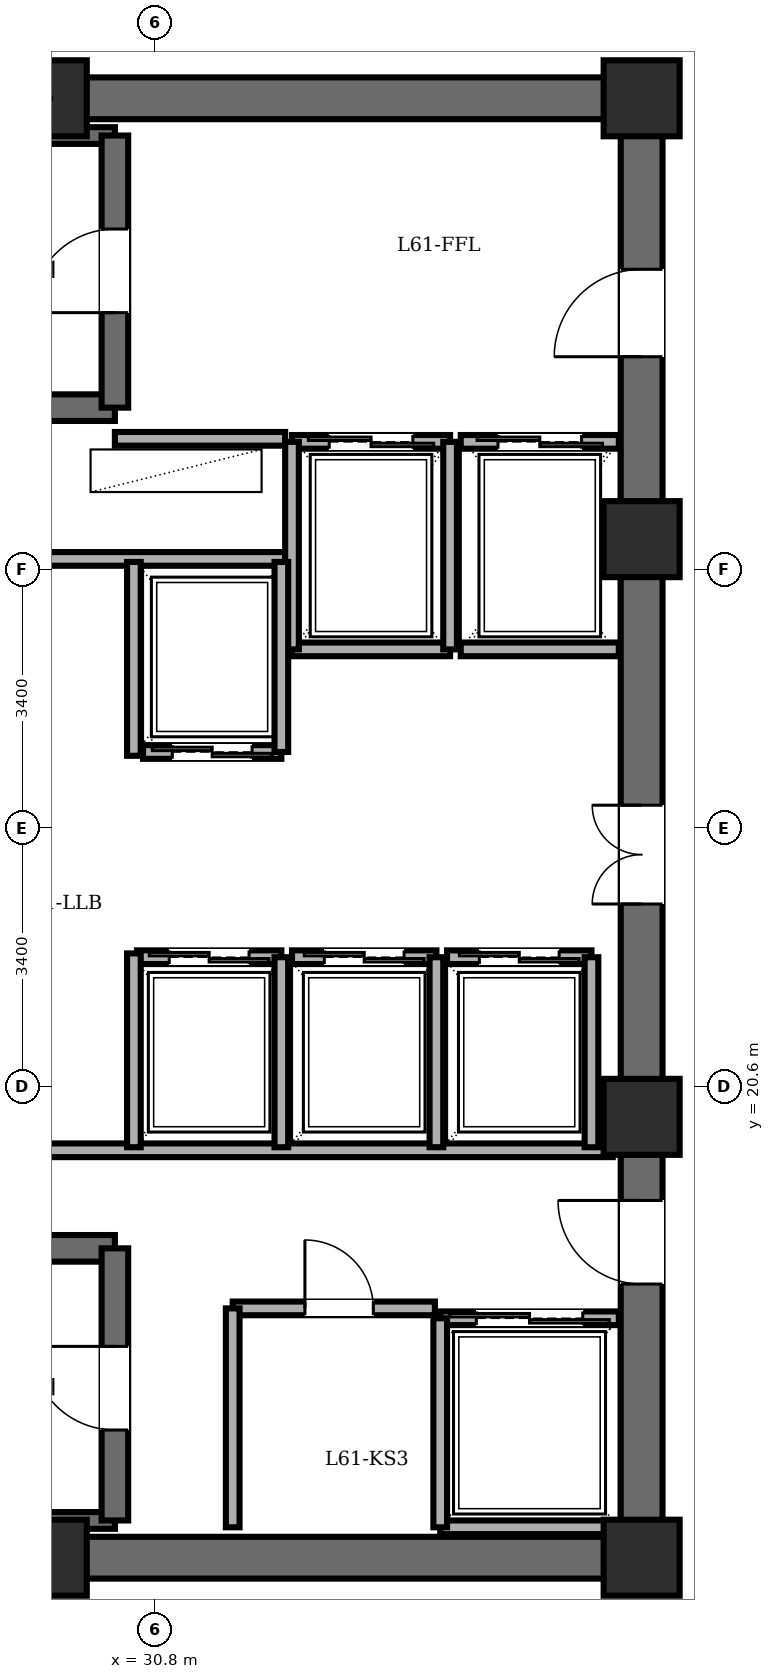
"""IFC4 building model, lengths in metres.
Left out: names, types, materials, properties, quantities, classifications, styles, units other than length and angle.
Written with IfcOpenShell. Run it as: python <this file> out.ifc"""

import sys

from ifc_helpers import new_model, si_unit, direction, frame, frame_2d, origin, origin_2d, place, context, subcontext, project, spatial, rectangle, extrude, element, fill, save


model = new_model("IFC4")
c1 = context("Model", 3, precision=1e-05, world=origin(), true_north=direction((0.0, 1.0)))
c2 = subcontext(c1, "Body", "Model", "MODEL_VIEW")
j1 = project(units=[si_unit("LENGTHUNIT", "METRE"), si_unit("PLANEANGLEUNIT", "RADIAN")], contexts=[c1])
p1 = place(None, origin())
s1 = spatial("IfcSite", under=j1, at=p1, CompositionType="ELEMENT")
p2 = place(p1, origin())
s2 = spatial("IfcBuilding", under=s1, at=p2, CompositionType="ELEMENT")
p3 = place(p2, frame((0.0, 0.0, 233.7)))
s3 = spatial("IfcBuildingStorey", under=s2, at=p3, CompositionType="ELEMENT", Elevation=233.7)
for number, where, z_axis, x_axis in (
    (1, (29.4, 14.4, 0.0), (0.0, 0.0, 1.0), (1.0, 0.0, 0.0)),
    (2, (37.2, 14.4, 0.0), (0.0, 0.0, 1.0), (1.0, 0.0, 0.0)),
    (3, (37.2, 20.2, 0.0), (0.0, 0.0, 1.0), (1.0, 0.0, 0.0)),
    (4, (37.2, 27.8, 0.0), (0.0, 0.0, 1.0), (1.0, 0.0, 0.0)),
    (5, (37.2, 33.6, 0.0), (0.0, 0.0, 1.0), (1.0, 0.0, 0.0)),
    (6, (29.4, 33.6, 0.0), (0.0, 0.0, 1.0), (1.0, 0.0, 0.0)),
):
    element("IfcColumn", number, at=place(p3, frame(where, z_axis=z_axis, x_axis=x_axis)), inside=s3, PredefinedType="COLUMN", context=c2, shape_type="SweptSolid", body=[
        extrude(rectangle(XDim=1.0, YDim=1.0, at=origin_2d()), origin(), (0.0, 0.0, 1.0), 3.6),
    ])
for number, where, z_axis, x_axis in (
    (7, (21.6, 33.6, 0.0), (0.0, 0.0, 1.0), (1.0, 0.0, 0.0)),
    (8, (37.2, 14.4, 0.0), (0.0, 0.0, 1.0), (-1.0, 0.0, 0.0)),
):
    element("IfcWall", number, at=place(p3, frame(where, z_axis=z_axis, x_axis=x_axis)), inside=s3, PredefinedType="SHEAR", context=c2, shape_type="SweptSolid", body=[
        extrude(rectangle(XDim=15.6, YDim=0.55, at=frame_2d((7.8, 0.0))), origin(), (0.0, 0.0, 1.0), 3.4),
    ])
p4 = place(p3, frame((37.2, 14.4, 0.0), z_axis=(0.0, 0.0, 1.0), x_axis=(0.0, 1.0, 0.0)))
e9 = element("IfcWall", 9, at=p4, inside=s3, PredefinedType="SHEAR", context=c2, shape_type="SweptSolid", body=[
    extrude(rectangle(XDim=19.2, YDim=0.55, at=frame_2d((9.6, 0.0))), origin(), (0.0, 0.0, 1.0), 3.4),
])
p5 = place(p4, frame((15.8, 0.0, 0.0)))
e10 = element("IfcOpeningElement", 10, at=p5, cuts=e9, PredefinedType="OPENING", context=c2, shape_type="SweptSolid", body=[
    extrude(rectangle(XDim=1.15, YDim=2.15, at=frame_2d((0.575, 1.075))), frame((0.0, 0.285, 0.0), z_axis=(0.0, -1.0, 0.0), x_axis=(1.0, 0.0, 0.0)), (0.0, 0.0, 1.0), 0.57),
])
p6 = place(p4, frame((3.6, 0.0, 0.0)))
e11 = element("IfcOpeningElement", 11, at=p6, cuts=e9, PredefinedType="OPENING", context=c2, shape_type="SweptSolid", body=[
    extrude(rectangle(XDim=1.1, YDim=2.15, at=frame_2d((0.55, 1.075))), frame((0.0, 0.285, 0.0), z_axis=(0.0, -1.0, 0.0), x_axis=(1.0, 0.0, 0.0)), (0.0, 0.0, 1.0), 0.57),
])
p7 = place(p4, frame((8.6, 0.0, 0.0)))
e12 = element("IfcOpeningElement", 12, at=p7, cuts=e9, PredefinedType="OPENING", context=c2, shape_type="SweptSolid", body=[
    extrude(rectangle(XDim=1.3, YDim=2.2, at=frame_2d((0.65, 1.1))), frame((0.0, 0.285, 0.0), z_axis=(0.0, -1.0, 0.0), x_axis=(1.0, 0.0, 0.0)), (0.0, 0.0, 1.0), 0.57),
])
p8 = place(p3, frame((22.48, 29.53, 0.0), z_axis=(0.0, 0.0, 1.0), x_axis=(1.0, 0.0, 0.0)))
e13 = element("IfcWall", 13, at=p8, inside=s3, PredefinedType="SOLIDWALL", context=c2, shape_type="SweptSolid", body=[
    extrude(rectangle(XDim=7.79, YDim=0.35, at=frame_2d((3.895, 0.0))), origin(), (0.0, 0.0, 1.0), 3.4),
])
p9 = place(p3, frame((22.48, 33.11, 0.0), z_axis=(0.0, 0.0, 1.0), x_axis=(1.0, 0.0, 0.0)))
e14 = element("IfcWall", 14, at=p9, inside=s3, PredefinedType="PARTITIONING", context=c2, shape_type="SweptSolid", body=[
    extrude(rectangle(XDim=7.79, YDim=0.22, at=frame_2d((3.895, 0.0))), origin(), (0.0, 0.0, 1.0), 3.4),
])
p10 = place(p3, frame((30.27, 29.53, 0.0), z_axis=(0.0, 0.0, 1.0), x_axis=(0.0, 1.0, 0.0)))
e15 = element("IfcWall", 15, at=p10, inside=s3, PredefinedType="SOLIDWALL", context=c2, shape_type="SweptSolid", body=[
    extrude(rectangle(XDim=3.58, YDim=0.35, at=frame_2d((1.79, 0.0))), origin(), (0.0, 0.0, 1.0), 3.4),
])
p11 = place(p10, frame((1.25, 0.0, 0.0)))
e16 = element("IfcOpeningElement", 16, at=p11, cuts=e15, PredefinedType="OPENING", context=c2, shape_type="SweptSolid", body=[
    extrude(rectangle(XDim=1.1, YDim=2.15, at=frame_2d((0.55, 1.075))), frame((0.0, 0.185, 0.0), z_axis=(0.0, -1.0, 0.0), x_axis=(1.0, 0.0, 0.0)), (0.0, 0.0, 1.0), 0.37),
])
p12 = place(p3, frame((22.48, 18.47, 0.0), z_axis=(0.0, 0.0, 1.0), x_axis=(1.0, 0.0, 0.0)))
e17 = element("IfcWall", 17, at=p12, inside=s3, PredefinedType="SOLIDWALL", context=c2, shape_type="SweptSolid", body=[
    extrude(rectangle(XDim=7.79, YDim=0.35, at=frame_2d((3.895, 0.0))), origin(), (0.0, 0.0, 1.0), 3.4),
])
p13 = place(p3, frame((22.48, 14.89, 0.0), z_axis=(0.0, 0.0, 1.0), x_axis=(1.0, 0.0, 0.0)))
e18 = element("IfcWall", 18, at=p13, inside=s3, PredefinedType="PARTITIONING", context=c2, shape_type="SweptSolid", body=[
    extrude(rectangle(XDim=7.79, YDim=0.22, at=frame_2d((3.895, 0.0))), origin(), (0.0, 0.0, 1.0), 3.4),
])
p14 = place(p3, frame((30.27, 14.89, 0.0), z_axis=(0.0, 0.0, 1.0), x_axis=(0.0, 1.0, 0.0)))
e19 = element("IfcWall", 19, at=p14, inside=s3, PredefinedType="SOLIDWALL", context=c2, shape_type="SweptSolid", body=[
    extrude(rectangle(XDim=3.58, YDim=0.35, at=frame_2d((1.79, 0.0))), origin(), (0.0, 0.0, 1.0), 3.4),
])
p15 = place(p14, frame((1.19, 0.0, 0.0)))
e20 = element("IfcOpeningElement", 20, at=p15, cuts=e19, PredefinedType="OPENING", context=c2, shape_type="SweptSolid", body=[
    extrude(rectangle(XDim=1.1, YDim=2.15, at=frame_2d((0.55, 1.075))), frame((0.0, 0.185, 0.0), z_axis=(0.0, -1.0, 0.0), x_axis=(1.0, 0.0, 0.0)), (0.0, 0.0, 1.0), 0.37),
])
p16 = place(p3, frame((30.27, 29.12, 0.0), z_axis=(0.0, 0.0, 1.0), x_axis=(1.0, 0.0, 0.0)))
e21 = element("IfcWall", 21, at=p16, inside=s3, PredefinedType="PARTITIONING", context=c2, shape_type="SweptSolid", body=[
    extrude(rectangle(XDim=2.24, YDim=0.18, at=frame_2d((1.12, 0.0))), origin(), (0.0, 0.0, 1.0), 3.4),
])
p17 = place(p3, frame((21.95, 27.54, 0.0), z_axis=(0.0, 0.0, 1.0), x_axis=(1.0, 0.0, 0.0)))
e22 = element("IfcWall", 22, at=p17, inside=s3, PredefinedType="PARTITIONING", context=c2, shape_type="SweptSolid", body=[
    extrude(rectangle(XDim=10.56, YDim=0.18, at=frame_2d((5.28, 0.0))), origin(), (0.0, 0.0, 1.0), 3.4),
])
p18 = place(p3, frame((21.95, 19.76, 0.0), z_axis=(0.0, 0.0, 1.0), x_axis=(1.0, 0.0, 0.0)))
e23 = element("IfcWall", 23, at=p18, inside=s3, PredefinedType="PARTITIONING", context=c2, shape_type="SweptSolid", body=[
    extrude(rectangle(XDim=14.87, YDim=0.18, at=frame_2d((7.435, 0.0))), origin(), (0.0, 0.0, 1.0), 3.4),
])
p19 = place(p3, frame((31.82, 17.68, 0.0), z_axis=(0.0, 0.0, 1.0), x_axis=(1.0, 0.0, 0.0)))
e24 = element("IfcWall", 24, at=p19, inside=s3, PredefinedType="PARTITIONING", context=c2, shape_type="SweptSolid", body=[
    extrude(rectangle(XDim=2.66, YDim=0.18, at=frame_2d((1.33, 0.0))), origin(), (0.0, 0.0, 1.0), 3.4),
])
p20 = place(p19, frame((0.95, 0.0, 0.0)))
e25 = element("IfcOpeningElement", 25, at=p20, cuts=e24, PredefinedType="OPENING", context=c2, shape_type="SweptSolid", body=[
    extrude(rectangle(XDim=0.9, YDim=2.05, at=frame_2d((0.45, 1.025))), frame((0.0, 0.1, 0.0), z_axis=(0.0, -1.0, 0.0), x_axis=(1.0, 0.0, 0.0)), (0.0, 0.0, 1.0), 0.2),
])
p21 = place(p3, frame((31.82, 14.8, 0.0), z_axis=(0.0, 0.0, 1.0), x_axis=(0.0, 1.0, 0.0)))
e26 = element("IfcWall", 26, at=p21, inside=s3, PredefinedType="PARTITIONING", context=c2, shape_type="SweptSolid", body=[
    extrude(rectangle(XDim=2.88, YDim=0.18, at=frame_2d((1.44, 0.0))), origin(), (0.0, 0.0, 1.0), 3.4),
])
p22 = place(p3, frame((32.6, 29.08, 0.0), z_axis=(0.0, 0.0, 1.0), x_axis=(1.0, 0.0, 0.0)))
e27 = element("IfcWall", 27, at=p22, inside=s3, PredefinedType="PARTITIONING", context=c2, shape_type="SweptSolid", body=[
    extrude(rectangle(XDim=2.08, YDim=0.18, at=frame_2d((1.04, 0.0))), origin(), (0.0, 0.0, 1.0), 3.4),
])
p23 = place(p22, frame((0.49, 0.0, 0.0)))
e28 = element("IfcOpeningElement", 28, at=p23, cuts=e27, PredefinedType="OPENING", context=c2, shape_type="SweptSolid", body=[
    extrude(rectangle(XDim=1.1, YDim=2.2, at=frame_2d((0.55, 1.1))), frame((0.0, 0.1, 0.0), z_axis=(0.0, -1.0, 0.0), x_axis=(1.0, 0.0, 0.0)), (0.0, 0.0, 1.0), 0.2),
])
p24 = place(p3, frame((34.68, 26.35, 0.0), z_axis=(0.0, 0.0, 1.0), x_axis=(-1.0, 0.0, 0.0)))
e29 = element("IfcWall", 29, at=p24, inside=s3, PredefinedType="PARTITIONING", context=c2, shape_type="SweptSolid", body=[
    extrude(rectangle(XDim=2.08, YDim=0.18, at=frame_2d((1.04, 0.0))), origin(), (0.0, 0.0, 1.0), 3.4),
])
for number, where, z_axis, x_axis in (
    (30, (34.68, 26.35, 0.0), (0.0, 0.0, 1.0), (0.0, 1.0, 0.0)),
    (31, (32.6, 29.08, 0.0), (0.0, 0.0, 1.0), (0.0, -1.0, 0.0)),
):
    element("IfcWall", number, at=place(p3, frame(where, z_axis=z_axis, x_axis=x_axis)), inside=s3, PredefinedType="PARTITIONING", context=c2, shape_type="SweptSolid", body=[
        extrude(rectangle(XDim=2.73, YDim=0.18, at=frame_2d((1.365, 0.0))), origin(), (0.0, 0.0, 1.0), 3.4),
    ])
p25 = place(p3, frame((34.82, 29.08, 0.0), z_axis=(0.0, 0.0, 1.0), x_axis=(1.0, 0.0, 0.0)))
e32 = element("IfcWall", 32, at=p25, inside=s3, PredefinedType="PARTITIONING", context=c2, shape_type="SweptSolid", body=[
    extrude(rectangle(XDim=2.08, YDim=0.18, at=frame_2d((1.04, 0.0))), origin(), (0.0, 0.0, 1.0), 3.4),
])
p26 = place(p25, frame((0.49, 0.0, 0.0)))
e33 = element("IfcOpeningElement", 33, at=p26, cuts=e32, PredefinedType="OPENING", context=c2, shape_type="SweptSolid", body=[
    extrude(rectangle(XDim=1.1, YDim=2.2, at=frame_2d((0.55, 1.1))), frame((0.0, 0.1, 0.0), z_axis=(0.0, -1.0, 0.0), x_axis=(1.0, 0.0, 0.0)), (0.0, 0.0, 1.0), 0.2),
])
p27 = place(p3, frame((36.9, 26.35, 0.0), z_axis=(0.0, 0.0, 1.0), x_axis=(-1.0, 0.0, 0.0)))
e34 = element("IfcWall", 34, at=p27, inside=s3, PredefinedType="PARTITIONING", context=c2, shape_type="SweptSolid", body=[
    extrude(rectangle(XDim=2.08, YDim=0.18, at=frame_2d((1.04, 0.0))), origin(), (0.0, 0.0, 1.0), 3.4),
])
p28 = place(p3, frame((34.55, 17.55, 0.0), z_axis=(0.0, 0.0, 1.0), x_axis=(1.0, 0.0, 0.0)))
e35 = element("IfcWall", 35, at=p28, inside=s3, PredefinedType="PARTITIONING", context=c2, shape_type="SweptSolid", body=[
    extrude(rectangle(XDim=2.35, YDim=0.18, at=frame_2d((1.175, 0.0))), origin(), (0.0, 0.0, 1.0), 3.4),
])
p29 = place(p28, frame((0.475, 0.0, 0.0)))
e36 = element("IfcOpeningElement", 36, at=p29, cuts=e35, PredefinedType="OPENING", context=c2, shape_type="SweptSolid", body=[
    extrude(rectangle(XDim=1.4, YDim=2.3, at=frame_2d((0.7, 1.15))), frame((0.0, 0.1, 0.0), z_axis=(0.0, -1.0, 0.0), x_axis=(1.0, 0.0, 0.0)), (0.0, 0.0, 1.0), 0.2),
])
p30 = place(p3, frame((36.9, 14.8, 0.0), z_axis=(0.0, 0.0, 1.0), x_axis=(-1.0, 0.0, 0.0)))
e37 = element("IfcWall", 37, at=p30, inside=s3, PredefinedType="PARTITIONING", context=c2, shape_type="SweptSolid", body=[
    extrude(rectangle(XDim=2.35, YDim=0.18, at=frame_2d((1.175, 0.0))), origin(), (0.0, 0.0, 1.0), 3.4),
])
p31 = place(p3, frame((34.55, 17.55, 0.0), z_axis=(0.0, 0.0, 1.0), x_axis=(0.0, -1.0, 0.0)))
e38 = element("IfcWall", 38, at=p31, inside=s3, PredefinedType="PARTITIONING", context=c2, shape_type="SweptSolid", body=[
    extrude(rectangle(XDim=2.75, YDim=0.18, at=frame_2d((1.375, 0.0))), origin(), (0.0, 0.0, 1.0), 3.4),
])
p32 = place(p3, frame((32.46, 25.0, 0.0), z_axis=(0.0, 0.0, 1.0), x_axis=(-1.0, 0.0, 0.0)))
e39 = element("IfcWall", 39, at=p32, inside=s3, PredefinedType="PARTITIONING", context=c2, shape_type="SweptSolid", body=[
    extrude(rectangle(XDim=1.82, YDim=0.18, at=frame_2d((0.91, 0.0))), origin(), (0.0, 0.0, 1.0), 3.4),
])
p33 = place(p32, frame((0.385, 0.0, 0.0)))
e40 = element("IfcOpeningElement", 40, at=p33, cuts=e39, PredefinedType="OPENING", context=c2, shape_type="SweptSolid", body=[
    extrude(rectangle(XDim=1.05, YDim=2.2, at=frame_2d((0.525, 1.1))), frame((0.0, 0.1, 0.0), z_axis=(0.0, -1.0, 0.0), x_axis=(1.0, 0.0, 0.0)), (0.0, 0.0, 1.0), 0.2),
])
p34 = place(p3, frame((32.46, 25.0, 0.0), z_axis=(0.0, 0.0, 1.0), x_axis=(0.0, 1.0, 0.0)))
e41 = element("IfcWall", 41, at=p34, inside=s3, PredefinedType="PARTITIONING", context=c2, shape_type="SweptSolid", body=[
    extrude(rectangle(XDim=2.5, YDim=0.18, at=frame_2d((1.25, 0.0))), origin(), (0.0, 0.0, 1.0), 3.4),
])
p35 = place(p3, frame((30.56, 22.3, 0.0), z_axis=(0.0, 0.0, 1.0), x_axis=(1.0, 0.0, 0.0)))
e42 = element("IfcWall", 42, at=p35, inside=s3, PredefinedType="PARTITIONING", context=c2, shape_type="SweptSolid", body=[
    extrude(rectangle(XDim=1.9, YDim=0.18, at=frame_2d((0.95, 0.0))), origin(), (0.0, 0.0, 1.0), 3.4),
])
p36 = place(p35, frame((0.425, 0.0, 0.0)))
e43 = element("IfcOpeningElement", 43, at=p36, cuts=e42, PredefinedType="OPENING", context=c2, shape_type="SweptSolid", body=[
    extrude(rectangle(XDim=1.05, YDim=2.2, at=frame_2d((0.525, 1.1))), frame((0.0, 0.1, 0.0), z_axis=(0.0, -1.0, 0.0), x_axis=(1.0, 0.0, 0.0)), (0.0, 0.0, 1.0), 0.2),
])
p37 = place(p3, frame((32.46, 19.8, 0.0), z_axis=(0.0, 0.0, 1.0), x_axis=(0.0, 1.0, 0.0)))
e44 = element("IfcWall", 44, at=p37, inside=s3, PredefinedType="PARTITIONING", context=c2, shape_type="SweptSolid", body=[
    extrude(rectangle(XDim=2.5, YDim=0.18, at=frame_2d((1.25, 0.0))), origin(), (0.0, 0.0, 1.0), 3.4),
])
p38 = place(p3, frame((32.6, 22.3, 0.0), z_axis=(0.0, 0.0, 1.0), x_axis=(1.0, 0.0, 0.0)))
e45 = element("IfcWall", 45, at=p38, inside=s3, PredefinedType="PARTITIONING", context=c2, shape_type="SweptSolid", body=[
    extrude(rectangle(XDim=1.9, YDim=0.18, at=frame_2d((0.95, 0.0))), origin(), (0.0, 0.0, 1.0), 3.4),
])
p39 = place(p38, frame((0.425, 0.0, 0.0)))
e46 = element("IfcOpeningElement", 46, at=p39, cuts=e45, PredefinedType="OPENING", context=c2, shape_type="SweptSolid", body=[
    extrude(rectangle(XDim=1.05, YDim=2.2, at=frame_2d((0.525, 1.1))), frame((0.0, 0.1, 0.0), z_axis=(0.0, -1.0, 0.0), x_axis=(1.0, 0.0, 0.0)), (0.0, 0.0, 1.0), 0.2),
])
p40 = place(p3, frame((34.5, 19.8, 0.0), z_axis=(0.0, 0.0, 1.0), x_axis=(0.0, 1.0, 0.0)))
e47 = element("IfcWall", 47, at=p40, inside=s3, PredefinedType="PARTITIONING", context=c2, shape_type="SweptSolid", body=[
    extrude(rectangle(XDim=2.5, YDim=0.18, at=frame_2d((1.25, 0.0))), origin(), (0.0, 0.0, 1.0), 3.4),
])
p41 = place(p3, frame((34.64, 22.3, 0.0), z_axis=(0.0, 0.0, 1.0), x_axis=(1.0, 0.0, 0.0)))
e48 = element("IfcWall", 48, at=p41, inside=s3, PredefinedType="PARTITIONING", context=c2, shape_type="SweptSolid", body=[
    extrude(rectangle(XDim=1.9, YDim=0.18, at=frame_2d((0.95, 0.0))), origin(), (0.0, 0.0, 1.0), 3.4),
])
p42 = place(p41, frame((0.425, 0.0, 0.0)))
e49 = element("IfcOpeningElement", 49, at=p42, cuts=e48, PredefinedType="OPENING", context=c2, shape_type="SweptSolid", body=[
    extrude(rectangle(XDim=1.05, YDim=2.2, at=frame_2d((0.525, 1.1))), frame((0.0, 0.1, 0.0), z_axis=(0.0, -1.0, 0.0), x_axis=(1.0, 0.0, 0.0)), (0.0, 0.0, 1.0), 0.2),
])
p43 = place(p3, frame((36.54, 19.8, 0.0), z_axis=(0.0, 0.0, 1.0), x_axis=(0.0, 1.0, 0.0)))
e50 = element("IfcWall", 50, at=p43, inside=s3, PredefinedType="PARTITIONING", context=c2, shape_type="SweptSolid", body=[
    extrude(rectangle(XDim=2.5, YDim=0.18, at=frame_2d((1.25, 0.0))), origin(), (0.0, 0.0, 1.0), 3.4),
])
for number, where, z_axis, x_axis in (
    (51, (30.52, 24.95, 0.0), (0.0, 0.0, 1.0), (0.0, 1.0, 0.0)),
    (52, (30.52, 19.8, 0.0), (0.0, 0.0, 1.0), (0.0, 1.0, 0.0)),
):
    element("IfcWall", number, at=place(p3, frame(where, z_axis=z_axis, x_axis=x_axis)), inside=s3, PredefinedType="PARTITIONING", context=c2, shape_type="SweptSolid", body=[
        extrude(rectangle(XDim=2.55, YDim=0.18, at=frame_2d((1.275, 0.0))), origin(), (0.0, 0.0, 1.0), 3.4),
    ])
p44 = place(p11, origin())
e53 = element("IfcDoor", 53, at=p44, inside=s3, OperationType="SINGLE_SWING_LEFT", PredefinedType="DOOR", context=c2, shape_type="SweptSolid", body=[
    extrude(rectangle(XDim=1.1, YDim=2.15, at=frame_2d((0.55, 1.075))), frame((0.0, 0.025, 0.0), z_axis=(0.0, -1.0, 0.0), x_axis=(1.0, 0.0, 0.0)), (0.0, 0.0, 1.0), 0.05),
])
fill(e16, e53)
p45 = place(p15, origin())
e54 = element("IfcDoor", 54, at=p45, inside=s3, OperationType="SINGLE_SWING_RIGHT", PredefinedType="DOOR", context=c2, shape_type="SweptSolid", body=[
    extrude(rectangle(XDim=1.1, YDim=2.15, at=frame_2d((0.55, 1.075))), frame((0.0, 0.025, 0.0), z_axis=(0.0, -1.0, 0.0), x_axis=(1.0, 0.0, 0.0)), (0.0, 0.0, 1.0), 0.05),
])
fill(e20, e54)
p46 = place(p5, origin())
e55 = element("IfcDoor", 55, at=p46, inside=s3, OperationType="SINGLE_SWING_LEFT", PredefinedType="DOOR", context=c2, shape_type="SweptSolid", body=[
    extrude(rectangle(XDim=1.15, YDim=2.15, at=frame_2d((0.575, 1.075))), frame((0.0, 0.025, 0.0), z_axis=(0.0, -1.0, 0.0), x_axis=(1.0, 0.0, 0.0)), (0.0, 0.0, 1.0), 0.05),
])
fill(e10, e55)
p47 = place(p6, origin())
e56 = element("IfcDoor", 56, at=p47, inside=s3, OperationType="SINGLE_SWING_RIGHT", PredefinedType="DOOR", context=c2, shape_type="SweptSolid", body=[
    extrude(rectangle(XDim=1.1, YDim=2.15, at=frame_2d((0.55, 1.075))), frame((0.0, 0.025, 0.0), z_axis=(0.0, -1.0, 0.0), x_axis=(1.0, 0.0, 0.0)), (0.0, 0.0, 1.0), 0.05),
])
fill(e11, e56)
p48 = place(p20, origin())
e57 = element("IfcDoor", 57, at=p48, inside=s3, OperationType="SINGLE_SWING_LEFT", PredefinedType="DOOR", context=c2, shape_type="SweptSolid", body=[
    extrude(rectangle(XDim=0.9, YDim=2.05, at=frame_2d((0.45, 1.025))), frame((0.0, 0.025, 0.0), z_axis=(0.0, -1.0, 0.0), x_axis=(1.0, 0.0, 0.0)), (0.0, 0.0, 1.0), 0.05),
])
fill(e25, e57)
p49 = place(p23, origin())
e58 = element("IfcDoor", 58, at=p49, inside=s3, OperationType="DOUBLE_DOOR_SLIDING", PredefinedType="DOOR", context=c2, shape_type="SweptSolid", body=[
    extrude(rectangle(XDim=1.1, YDim=2.2, at=frame_2d((0.55, 1.1))), frame((0.0, 0.025, 0.0), z_axis=(0.0, -1.0, 0.0), x_axis=(1.0, 0.0, 0.0)), (0.0, 0.0, 1.0), 0.05),
])
fill(e28, e58)
p50 = place(p26, origin())
e59 = element("IfcDoor", 59, at=p50, inside=s3, OperationType="DOUBLE_DOOR_SLIDING", PredefinedType="DOOR", context=c2, shape_type="SweptSolid", body=[
    extrude(rectangle(XDim=1.1, YDim=2.2, at=frame_2d((0.55, 1.1))), frame((0.0, 0.025, 0.0), z_axis=(0.0, -1.0, 0.0), x_axis=(1.0, 0.0, 0.0)), (0.0, 0.0, 1.0), 0.05),
])
fill(e33, e59)
p51 = place(p29, origin())
e60 = element("IfcDoor", 60, at=p51, inside=s3, OperationType="DOUBLE_DOOR_SLIDING", PredefinedType="DOOR", context=c2, shape_type="SweptSolid", body=[
    extrude(rectangle(XDim=1.4, YDim=2.3, at=frame_2d((0.7, 1.15))), frame((0.0, 0.025, 0.0), z_axis=(0.0, -1.0, 0.0), x_axis=(1.0, 0.0, 0.0)), (0.0, 0.0, 1.0), 0.05),
])
fill(e36, e60)
p52 = place(p33, origin())
e61 = element("IfcDoor", 61, at=p52, inside=s3, OperationType="DOUBLE_DOOR_SLIDING", PredefinedType="DOOR", context=c2, shape_type="SweptSolid", body=[
    extrude(rectangle(XDim=1.05, YDim=2.2, at=frame_2d((0.525, 1.1))), frame((0.0, 0.025, 0.0), z_axis=(0.0, -1.0, 0.0), x_axis=(1.0, 0.0, 0.0)), (0.0, 0.0, 1.0), 0.05),
])
fill(e40, e61)
p53 = place(p36, origin())
e62 = element("IfcDoor", 62, at=p53, inside=s3, OperationType="DOUBLE_DOOR_SLIDING", PredefinedType="DOOR", context=c2, shape_type="SweptSolid", body=[
    extrude(rectangle(XDim=1.05, YDim=2.2, at=frame_2d((0.525, 1.1))), frame((0.0, 0.025, 0.0), z_axis=(0.0, -1.0, 0.0), x_axis=(1.0, 0.0, 0.0)), (0.0, 0.0, 1.0), 0.05),
])
fill(e43, e62)
p54 = place(p39, origin())
e63 = element("IfcDoor", 63, at=p54, inside=s3, OperationType="DOUBLE_DOOR_SLIDING", PredefinedType="DOOR", context=c2, shape_type="SweptSolid", body=[
    extrude(rectangle(XDim=1.05, YDim=2.2, at=frame_2d((0.525, 1.1))), frame((0.0, 0.025, 0.0), z_axis=(0.0, -1.0, 0.0), x_axis=(1.0, 0.0, 0.0)), (0.0, 0.0, 1.0), 0.05),
])
fill(e46, e63)
p55 = place(p42, origin())
e64 = element("IfcDoor", 64, at=p55, inside=s3, OperationType="DOUBLE_DOOR_SLIDING", PredefinedType="DOOR", context=c2, shape_type="SweptSolid", body=[
    extrude(rectangle(XDim=1.05, YDim=2.2, at=frame_2d((0.525, 1.1))), frame((0.0, 0.025, 0.0), z_axis=(0.0, -1.0, 0.0), x_axis=(1.0, 0.0, 0.0)), (0.0, 0.0, 1.0), 0.05),
])
fill(e49, e64)
p56 = place(p7, origin())
e65 = element("IfcDoor", 65, at=p56, inside=s3, OperationType="DOUBLE_DOOR_SINGLE_SWING", PredefinedType="DOOR", context=c2, shape_type="SweptSolid", body=[
    extrude(rectangle(XDim=1.3, YDim=2.2, at=frame_2d((0.65, 1.1))), frame((0.0, 0.025, 0.0), z_axis=(0.0, -1.0, 0.0), x_axis=(1.0, 0.0, 0.0)), (0.0, 0.0, 1.0), 0.05),
])
fill(e12, e65)
save(model, sys.argv[1])
